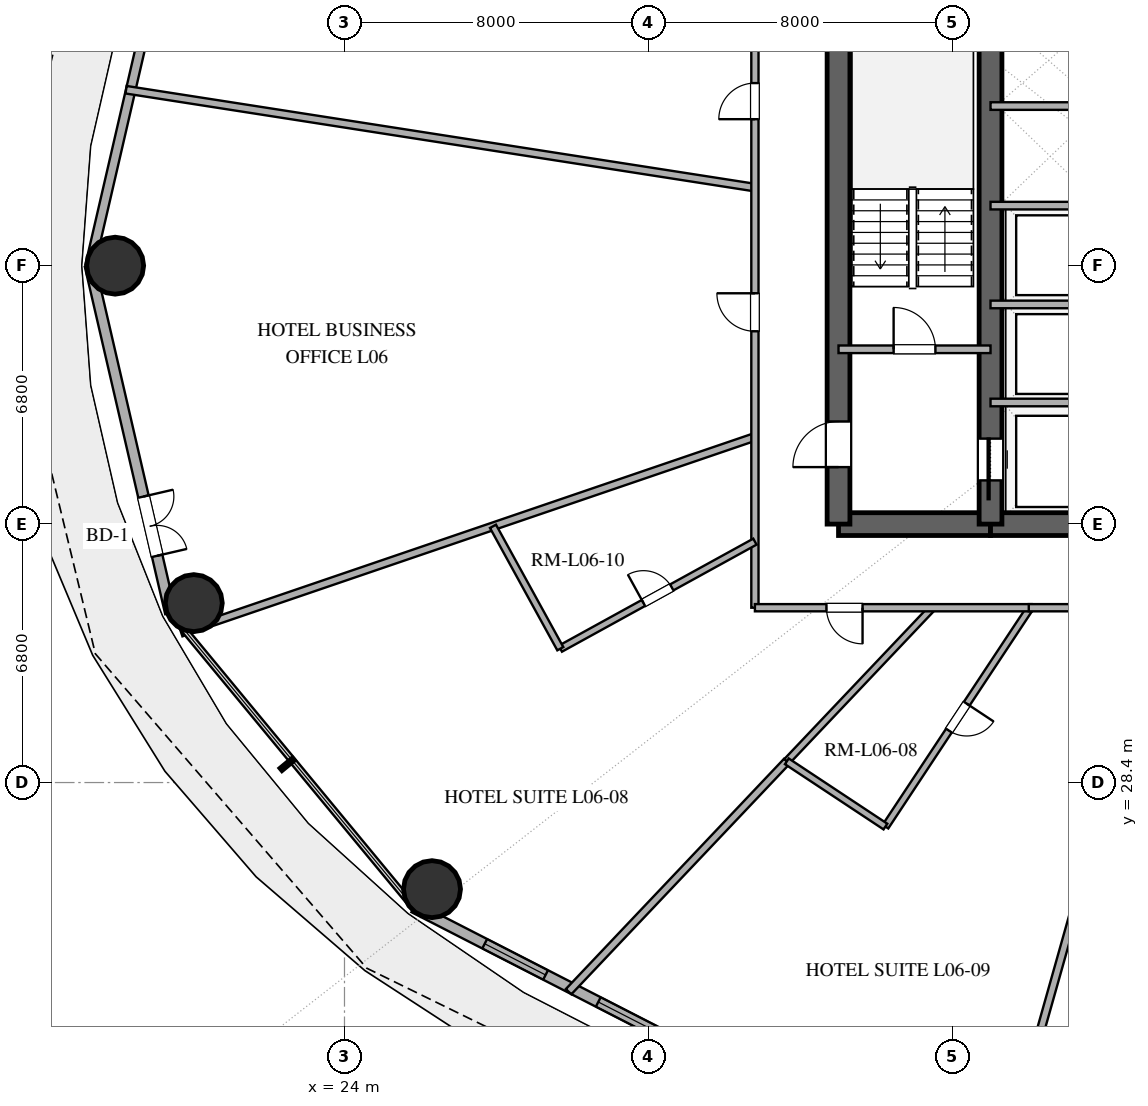
"""IFC4 building model, lengths in metres.
Left out: names, types, materials, properties, quantities, classifications, styles, units other than length and angle.
Written with IfcOpenShell. Run it as: python <this file> out.ifc"""

import sys

from ifc_helpers import new_model, si_unit, direction, frame, frame_2d, origin, origin_2d, place, context, subcontext, project, spatial, rectangle, hollow_circle, extrude, element, fill, save


model = new_model("IFC4")
c1 = context("Model", 3, precision=1e-05, world=origin(), true_north=direction((0.0, 1.0)))
c2 = subcontext(c1, "Body", "Model", "MODEL_VIEW")
j1 = project(units=[si_unit("LENGTHUNIT", "METRE"), si_unit("PLANEANGLEUNIT", "RADIAN")], contexts=[c1])
p1 = place(None, origin())
s1 = spatial("IfcSite", under=j1, at=p1, CompositionType="ELEMENT")
p2 = place(p1, origin())
s2 = spatial("IfcBuilding", under=s1, at=p2, CompositionType="ELEMENT")
p3 = place(p2, frame((0.0, 0.0, 31.8)))
s3 = spatial("IfcBuildingStorey", under=s2, at=p3, CompositionType="ELEMENT", Elevation=31.8)
p4 = place(p3, frame((37.0, 35.2, 0.0), z_axis=(0.0, 0.0, 1.0), x_axis=(1.0, 0.0, 0.0)))
e1 = element("IfcWall", 1, at=p4, inside=s3, PredefinedType="SHEAR", context=c2, shape_type="SweptSolid", body=[
    extrude(rectangle(XDim=4.0, YDim=0.6, at=frame_2d((2.0, 0.0))), origin(), (0.0, 0.0, 1.0), 3.38),
])
p5 = place(p3, frame((41.0, 35.2, 0.0), z_axis=(0.0, 0.0, 1.0), x_axis=(1.0, 0.0, 0.0)))
e2 = element("IfcWall", 2, at=p5, inside=s3, PredefinedType="SHEAR", context=c2, shape_type="SweptSolid", body=[
    extrude(rectangle(XDim=14.0, YDim=0.6, at=frame_2d((7.0, 0.0))), origin(), (0.0, 0.0, 1.0), 3.38),
])
p6 = place(p5, frame((6.1, 0.0, 0.0)))
e3 = element("IfcOpeningElement", 3, at=p6, cuts=e2, PredefinedType="OPENING", context=c2, shape_type="SweptSolid", body=[
    extrude(rectangle(XDim=1.8, YDim=2.25, at=frame_2d((0.9, 1.125))), frame((0.0, 0.31, 0.0), z_axis=(0.0, -1.0, 0.0), x_axis=(1.0, 0.0, 0.0)), (0.0, 0.0, 1.0), 0.62),
])
p7 = place(p3, frame((37.0, 35.2, 0.0), z_axis=(0.0, 0.0, 1.0), x_axis=(0.0, 1.0, 0.0)))
e4 = element("IfcWall", 4, at=p7, inside=s3, PredefinedType="SHEAR", context=c2, shape_type="SweptSolid", body=[
    extrude(rectangle(XDim=13.6, YDim=0.6, at=frame_2d((6.8, 0.0))), origin(), (0.0, 0.0, 1.0), 3.38),
])
p8 = place(p7, frame((1.5, 0.0, 0.0)))
e5 = element("IfcOpeningElement", 5, at=p8, cuts=e4, PredefinedType="OPENING", context=c2, shape_type="SweptSolid", body=[
    extrude(rectangle(XDim=1.2, YDim=2.15, at=frame_2d((0.6, 1.075))), frame((0.0, 0.31, 0.0), z_axis=(0.0, -1.0, 0.0), x_axis=(1.0, 0.0, 0.0)), (0.0, 0.0, 1.0), 0.62),
])
p9 = place(p3, frame((41.0, 35.2, 0.0), z_axis=(0.0, 0.0, 1.0), x_axis=(0.0, 1.0, 0.0)))
e6 = element("IfcWall", 6, at=p9, inside=s3, PredefinedType="SHEAR", context=c2, shape_type="SweptSolid", body=[
    extrude(rectangle(XDim=13.6, YDim=0.6, at=frame_2d((6.8, 0.0))), origin(), (0.0, 0.0, 1.0), 3.38),
])
p10 = place(p9, frame((1.15, 0.0, 0.0)))
e7 = element("IfcOpeningElement", 7, at=p10, cuts=e6, PredefinedType="OPENING", context=c2, shape_type="SweptSolid", body=[
    extrude(rectangle(XDim=1.1, YDim=2.2, at=frame_2d((0.55, 1.1))), frame((0.0, 0.31, 0.0), z_axis=(0.0, -1.0, 0.0), x_axis=(1.0, 0.0, 0.0)), (0.0, 0.0, 1.0), 0.62),
])
for number, where, z_axis, x_axis in (
    (8, (17.965, 42.0, 0.0), (0.0, 0.0, 1.0), (1.0, 0.0, 0.0)),
    (9, (20.034, 33.122, 0.0), (0.0, 0.0, 1.0), (1.0, 0.0, 0.0)),
    (10, (26.303, 25.595, 0.0), (0.0, 0.0, 1.0), (1.0, 0.0, 0.0)),
):
    element("IfcColumn", number, at=place(p3, frame(where, z_axis=z_axis, x_axis=x_axis)), inside=s3, PredefinedType="COLUMN", context=c2, shape_type="SweptSolid", body=[
        extrude(hollow_circle(Radius=0.75, WallThickness=0.04, at=origin_2d()), origin(), (0.0, 0.0, 1.0), 3.38),
    ])
p11 = place(p3, frame((19.419, 51.138, 0.0), z_axis=(0.0, 0.0, 1.0), x_axis=(-0.225454452941, -0.974253709076, 0.0)))
e11 = element("IfcWall", 11, at=p11, inside=s3, PredefinedType="SOLIDWALL", context=c2, shape_type="SweptSolid", body=[
    extrude(rectangle(XDim=9.38, YDim=0.25, at=frame_2d((4.69, 0.0))), origin(), (0.0, 0.0, 1.0), 3.38),
])
p12 = place(p3, frame((17.304, 42.0, 0.0), z_axis=(0.0, 0.0, 1.0), x_axis=(0.225454452941, -0.974253709076, 0.0)))
e12 = element("IfcWall", 12, at=p12, inside=s3, PredefinedType="SOLIDWALL", context=c2, shape_type="SweptSolid", body=[
    extrude(rectangle(XDim=9.38, YDim=0.28, at=frame_2d((4.69, 0.0))), origin(), (0.0, 0.0, 1.0), 3.38),
])
p13 = place(p12, frame((6.235, 0.0, 0.0)))
e13 = element("IfcOpeningElement", 13, at=p13, cuts=e12, PredefinedType="OPENING", context=c2, shape_type="SweptSolid", body=[
    extrude(rectangle(XDim=1.6, YDim=2.25, at=frame_2d((0.8, 1.125))), frame((0.0, 0.15, 0.0), z_axis=(0.0, -1.0, 0.0), x_axis=(1.0, 0.0, 0.0)), (0.0, 0.0, 1.0), 0.3),
])
p14 = place(p3, frame((25.826, 25.114, 0.0), z_axis=(0.0, 0.0, 1.0), x_axis=(0.889853976658, -0.456245438581, 0.0)))
e14 = element("IfcWall", 14, at=p14, inside=s3, PredefinedType="SOLIDWALL", context=c2, shape_type="SweptSolid", body=[
    extrude(rectangle(XDim=11.346, YDim=0.28, at=frame_2d((5.673, 0.0))), origin(), (0.0, 0.0, 1.0), 3.38),
])
p15 = place(p14, frame((2.095, 0.0, 0.85)))
e15 = element("IfcOpeningElement", 15, at=p15, cuts=e14, PredefinedType="OPENING", context=c2, shape_type="SweptSolid", body=[
    extrude(rectangle(XDim=1.8, YDim=2.2, at=frame_2d((0.9, 1.1))), frame((0.0, 0.15, 0.0), z_axis=(0.0, -1.0, 0.0), x_axis=(1.0, 0.0, 0.0)), (0.0, 0.0, 1.0), 0.3),
])
p16 = place(p14, frame((5.453, 0.0, 0.85)))
e16 = element("IfcOpeningElement", 16, at=p16, cuts=e14, PredefinedType="OPENING", context=c2, shape_type="SweptSolid", body=[
    extrude(rectangle(XDim=1.65, YDim=2.0, at=frame_2d((0.825, 1.0))), frame((0.0, 0.15, 0.0), z_axis=(0.0, -1.0, 0.0), x_axis=(1.0, 0.0, 0.0)), (0.0, 0.0, 1.0), 0.3),
])
p17 = place(p14, frame((7.672, 0.0, 0.85)))
e17 = element("IfcOpeningElement", 17, at=p17, cuts=e14, PredefinedType="OPENING", context=c2, shape_type="SweptSolid", body=[
    extrude(rectangle(XDim=1.65, YDim=2.0, at=frame_2d((0.825, 1.0))), frame((0.0, 0.15, 0.0), z_axis=(0.0, -1.0, 0.0), x_axis=(1.0, 0.0, 0.0)), (0.0, 0.0, 1.0), 0.3),
])
p18 = place(p3, frame((37.0, 39.8, 0.0), z_axis=(0.0, 0.0, 1.0), x_axis=(1.0, 0.0, 0.0)))
e18 = element("IfcWall", 18, at=p18, inside=s3, PredefinedType="SOLIDWALL", context=c2, shape_type="SweptSolid", body=[
    extrude(rectangle(XDim=4.0, YDim=0.2, at=frame_2d((2.0, 0.0))), origin(), (0.0, 0.0, 1.0), 2.74),
])
p19 = place(p18, frame((1.45, 0.0, 0.0)))
e19 = element("IfcOpeningElement", 19, at=p19, cuts=e18, PredefinedType="OPENING", context=c2, shape_type="SweptSolid", body=[
    extrude(rectangle(XDim=1.1, YDim=2.15, at=frame_2d((0.55, 1.075))), frame((0.0, 0.11, 0.0), z_axis=(0.0, -1.0, 0.0), x_axis=(1.0, 0.0, 0.0)), (0.0, 0.0, 1.0), 0.22),
])
for number, where, z_axis, x_axis in (
    (20, (41.0, 38.4, 0.0), (0.0, 0.0, 1.0), (1.0, 0.0, 0.0)),
    (21, (41.0, 46.2, 0.0), (0.0, 0.0, 1.0), (1.0, 0.0, 0.0)),
    (22, (41.0, 40.98, 0.0), (0.0, 0.0, 1.0), (1.0, 0.0, 0.0)),
    (23, (41.0, 43.58, 0.0), (0.0, 0.0, 1.0), (1.0, 0.0, 0.0)),
):
    element("IfcWall", number, at=place(p3, frame(where, z_axis=z_axis, x_axis=x_axis)), inside=s3, PredefinedType="SOLIDWALL", context=c2, shape_type="SweptSolid", body=[
        extrude(rectangle(XDim=2.95, YDim=0.2, at=frame_2d((1.475, 0.0))), origin(), (0.0, 0.0, 1.0), 2.74),
    ])
p20 = place(p3, frame((18.253, 46.63, 0.0), z_axis=(0.0, 0.0, 1.0), x_axis=(0.988105936892, -0.153774697134, 0.0)))
e24 = element("IfcWall", 24, at=p20, inside=s3, PredefinedType="PARTITIONING", context=c2, shape_type="SweptSolid", body=[
    extrude(rectangle(XDim=16.747, YDim=0.2, at=frame_2d((8.373, 0.0))), origin(), (0.0, 0.0, 1.0), 2.74),
])
p21 = place(p3, frame((34.8, 37.494, 0.0), z_axis=(0.0, 0.0, 1.0), x_axis=(-0.946390715793, -0.32302416792, 0.0)))
e25 = element("IfcWall", 25, at=p21, inside=s3, PredefinedType="PARTITIONING", context=c2, shape_type="SweptSolid", body=[
    extrude(rectangle(XDim=15.952, YDim=0.2, at=frame_2d((7.976, 0.0))), origin(), (0.0, 0.0, 1.0), 2.74),
])
p22 = place(p3, frame((29.897, 22.898, 0.0), z_axis=(0.0, 0.0, 1.0), x_axis=(0.687860615602, 0.725842802198, 0.0)))
e26 = element("IfcWall", 26, at=p22, inside=s3, PredefinedType="PARTITIONING", context=c2, shape_type="SweptSolid", body=[
    extrude(rectangle(XDim=8.35, YDim=0.2, at=frame_2d((4.175, 0.0))), origin(), (0.0, 0.0, 1.0), 2.74),
])
p23 = place(p3, frame((41.499, 18.978, 0.0), z_axis=(0.0, 0.0, 1.0), x_axis=(0.271768364569, 0.962362694632, 0.0)))
e27 = element("IfcWall", 27, at=p23, inside=s3, PredefinedType="PARTITIONING", context=c2, shape_type="SweptSolid", body=[
    extrude(rectangle(XDim=7.921, YDim=0.2, at=frame_2d((3.96, 0.0))), origin(), (0.0, 0.0, 1.0), 2.74),
])
p24 = place(p3, frame((42.045, 33.0, 0.0), z_axis=(0.0, 0.0, 1.0), x_axis=(-0.551832909025, -0.833954699319, 0.0)))
e28 = element("IfcWall", 28, at=p24, inside=s3, PredefinedType="PLUMBINGWALL", context=c2, shape_type="SweptSolid", body=[
    extrude(rectangle(XDim=6.905, YDim=0.18, at=frame_2d((3.452, 0.0))), origin(), (0.0, 0.0, 1.0), 2.74),
])
p25 = place(p24, frame((3.027, 0.0, 0.0)))
e29 = element("IfcOpeningElement", 29, at=p25, cuts=e28, PredefinedType="OPENING", context=c2, shape_type="SweptSolid", body=[
    extrude(rectangle(XDim=0.85, YDim=2.1, at=frame_2d((0.425, 1.05))), frame((0.0, 0.1, 0.0), z_axis=(0.0, -1.0, 0.0), x_axis=(1.0, 0.0, 0.0)), (0.0, 0.0, 1.0), 0.2),
])
p26 = place(p3, frame((34.8, 33.0, 0.0), z_axis=(0.0, 0.0, 1.0), x_axis=(0.0, 1.0, 0.0)))
e30 = element("IfcWall", 30, at=p26, inside=s3, PredefinedType="PARTITIONING", context=c2, shape_type="SweptSolid", body=[
    extrude(rectangle(XDim=18.0, YDim=0.19, at=frame_2d((9.0, 0.0))), origin(), (0.0, 0.0, 1.0), 2.74),
])
p27 = place(p26, frame((7.274, 0.0, 0.0)))
e31 = element("IfcOpeningElement", 31, at=p27, cuts=e30, PredefinedType="OPENING", context=c2, shape_type="SweptSolid", body=[
    extrude(rectangle(XDim=1.0, YDim=2.2, at=frame_2d((0.5, 1.1))), frame((0.0, 0.105, 0.0), z_axis=(0.0, -1.0, 0.0), x_axis=(1.0, 0.0, 0.0)), (0.0, 0.0, 1.0), 0.21),
])
p28 = place(p26, frame((12.854, 0.0, 0.0)))
e32 = element("IfcOpeningElement", 32, at=p28, cuts=e30, PredefinedType="OPENING", context=c2, shape_type="SweptSolid", body=[
    extrude(rectangle(XDim=0.95, YDim=2.15, at=frame_2d((0.475, 1.075))), frame((0.0, 0.105, 0.0), z_axis=(0.0, -1.0, 0.0), x_axis=(1.0, 0.0, 0.0)), (0.0, 0.0, 1.0), 0.21),
])
p29 = place(p3, frame((29.679, 31.922, 0.0), z_axis=(0.0, 0.0, 1.0), x_axis=(0.876185038284, 0.481974873503, 0.0)))
e33 = element("IfcWall", 33, at=p29, inside=s3, PredefinedType="PLUMBINGWALL", context=c2, shape_type="SweptSolid", body=[
    extrude(rectangle(XDim=5.844, YDim=0.18, at=frame_2d((2.922, 0.0))), origin(), (0.0, 0.0, 1.0), 2.74),
])
p30 = place(p29, frame((2.497, 0.0, 0.0)))
e34 = element("IfcOpeningElement", 34, at=p30, cuts=e33, PredefinedType="OPENING", context=c2, shape_type="SweptSolid", body=[
    extrude(rectangle(XDim=0.85, YDim=2.1, at=frame_2d((0.425, 1.05))), frame((0.0, 0.1, 0.0), z_axis=(0.0, -1.0, 0.0), x_axis=(1.0, 0.0, 0.0)), (0.0, 0.0, 1.0), 0.2),
])
p31 = place(p3, frame((35.64, 28.958, 0.0), z_axis=(0.0, 0.0, 1.0), x_axis=(0.687867465085, 0.725836311077, 0.0)))
e35 = element("IfcWall", 35, at=p31, inside=s3, PredefinedType="PLUMBINGWALL", context=c2, shape_type="SweptSolid", body=[
    extrude(rectangle(XDim=5.568, YDim=0.18, at=frame_2d((2.784, 0.0))), origin(), (0.0, 0.0, 1.0), 2.74),
])
p32 = place(p3, frame((42.083, 33.0, 0.0), z_axis=(0.0, 0.0, 1.0), x_axis=(-1.0, 0.0, 0.0)))
e36 = element("IfcWall", 36, at=p32, inside=s3, PredefinedType="PARTITIONING", context=c2, shape_type="SweptSolid", body=[
    extrude(rectangle(XDim=7.283, YDim=0.19, at=frame_2d((3.642, 0.0))), origin(), (0.0, 0.0, 1.0), 2.74),
])
p33 = place(p32, frame((4.451, 0.0, 0.0)))
e37 = element("IfcOpeningElement", 37, at=p33, cuts=e36, PredefinedType="OPENING", context=c2, shape_type="SweptSolid", body=[
    extrude(rectangle(XDim=0.95, YDim=2.15, at=frame_2d((0.475, 1.075))), frame((0.0, 0.105, 0.0), z_axis=(0.0, -1.0, 0.0), x_axis=(1.0, 0.0, 0.0)), (0.0, 0.0, 1.0), 0.21),
])
p34 = place(p3, frame((27.908, 35.142, 0.0), z_axis=(0.0, 0.0, 1.0), x_axis=(0.481967195945, -0.876189261537, 0.0)))
e38 = element("IfcWall", 38, at=p34, inside=s3, PredefinedType="PLUMBINGWALL", context=c2, shape_type="SweptSolid", body=[
    extrude(rectangle(XDim=3.676, YDim=0.18, at=frame_2d((1.838, 0.0))), origin(), (0.0, 0.0, 1.0), 2.74),
])
p35 = place(p3, frame((47.118, 33.0, 0.0), z_axis=(0.0, 0.0, 1.0), x_axis=(-1.0, 0.0, 0.0)))
e39 = element("IfcWall", 39, at=p35, inside=s3, PredefinedType="PARTITIONING", context=c2, shape_type="SweptSolid", body=[
    extrude(rectangle(XDim=5.112, YDim=0.19, at=frame_2d((2.556, 0.0))), origin(), (0.0, 0.0, 1.0), 2.74),
])
p36 = place(p35, frame((2.894, 0.0, 0.0)))
e40 = element("IfcOpeningElement", 40, at=p36, cuts=e39, PredefinedType="OPENING", context=c2, shape_type="SweptSolid", body=[
    extrude(rectangle(XDim=0.95, YDim=2.15, at=frame_2d((0.475, 1.075))), frame((0.0, 0.105, 0.0), z_axis=(0.0, -1.0, 0.0), x_axis=(1.0, 0.0, 0.0)), (0.0, 0.0, 1.0), 0.21),
])
p37 = place(p3, frame((38.235, 27.242, 0.0), z_axis=(0.0, 0.0, 1.0), x_axis=(-0.833965136837, 0.551817135055, 0.0)))
e41 = element("IfcWall", 41, at=p37, inside=s3, PredefinedType="PLUMBINGWALL", context=c2, shape_type="SweptSolid", body=[
    extrude(rectangle(XDim=3.111, YDim=0.18, at=frame_2d((1.555, 0.0))), origin(), (0.0, 0.0, 1.0), 2.74),
])
p38 = place(p13, origin())
e42 = element("IfcDoor", 42, at=p38, inside=s3, OperationType="DOUBLE_DOOR_SINGLE_SWING", PredefinedType="DOOR", context=c2, shape_type="SweptSolid", body=[
    extrude(rectangle(XDim=1.6, YDim=2.25, at=frame_2d((0.8, 1.125))), frame((0.0, 0.025, 0.0), z_axis=(0.0, -1.0, 0.0), x_axis=(1.0, 0.0, 0.0)), (0.0, 0.0, 1.0), 0.05),
])
fill(e13, e42)
p39 = place(p15, origin())
e43 = element("IfcWindow", 43, at=p39, inside=s3, PartitioningType="SINGLE_PANEL", PredefinedType="WINDOW", context=c2, shape_type="SweptSolid", body=[
    extrude(rectangle(XDim=1.8, YDim=2.2, at=frame_2d((0.9, 1.1))), frame((0.0, 0.03, 0.0), z_axis=(0.0, -1.0, 0.0), x_axis=(1.0, 0.0, 0.0)), (0.0, 0.0, 1.0), 0.06),
])
fill(e15, e43)
p40 = place(p16, origin())
e44 = element("IfcWindow", 44, at=p40, inside=s3, PartitioningType="SINGLE_PANEL", PredefinedType="WINDOW", context=c2, shape_type="SweptSolid", body=[
    extrude(rectangle(XDim=1.65, YDim=2.0, at=frame_2d((0.825, 1.0))), frame((0.0, 0.03, 0.0), z_axis=(0.0, -1.0, 0.0), x_axis=(1.0, 0.0, 0.0)), (0.0, 0.0, 1.0), 0.06),
])
fill(e16, e44)
p41 = place(p10, origin())
e45 = element("IfcDoor", 45, at=p41, inside=s3, OperationType="SLIDING_TO_LEFT", PredefinedType="DOOR", context=c2, shape_type="SweptSolid", body=[
    extrude(rectangle(XDim=1.1, YDim=2.2, at=frame_2d((0.55, 1.1))), frame((0.0, 0.025, 0.0), z_axis=(0.0, -1.0, 0.0), x_axis=(1.0, 0.0, 0.0)), (0.0, 0.0, 1.0), 0.05),
])
fill(e7, e45)
p42 = place(p8, origin())
e46 = element("IfcDoor", 46, at=p42, inside=s3, OperationType="SINGLE_SWING_LEFT", PredefinedType="DOOR", context=c2, shape_type="SweptSolid", body=[
    extrude(rectangle(XDim=1.2, YDim=2.15, at=frame_2d((0.6, 1.075))), frame((0.0, 0.025, 0.0), z_axis=(0.0, -1.0, 0.0), x_axis=(1.0, 0.0, 0.0)), (0.0, 0.0, 1.0), 0.05),
])
fill(e5, e46)
p43 = place(p19, origin())
e47 = element("IfcDoor", 47, at=p43, inside=s3, OperationType="SINGLE_SWING_LEFT", PredefinedType="DOOR", context=c2, shape_type="SweptSolid", body=[
    extrude(rectangle(XDim=1.1, YDim=2.15, at=frame_2d((0.55, 1.075))), frame((0.0, 0.025, 0.0), z_axis=(0.0, -1.0, 0.0), x_axis=(1.0, 0.0, 0.0)), (0.0, 0.0, 1.0), 0.05),
])
fill(e19, e47)
p44 = place(p25, origin())
e48 = element("IfcDoor", 48, at=p44, inside=s3, OperationType="SINGLE_SWING_LEFT", PredefinedType="DOOR", context=c2, shape_type="SweptSolid", body=[
    extrude(rectangle(XDim=0.85, YDim=2.1, at=frame_2d((0.425, 1.05))), frame((0.0, 0.025, 0.0), z_axis=(0.0, -1.0, 0.0), x_axis=(1.0, 0.0, 0.0)), (0.0, 0.0, 1.0), 0.05),
])
fill(e29, e48)
p45 = place(p27, origin())
e49 = element("IfcDoor", 49, at=p45, inside=s3, OperationType="SINGLE_SWING_RIGHT", PredefinedType="DOOR", context=c2, shape_type="SweptSolid", body=[
    extrude(rectangle(XDim=1.0, YDim=2.2, at=frame_2d((0.5, 1.1))), frame((0.0, 0.025, 0.0), z_axis=(0.0, -1.0, 0.0), x_axis=(1.0, 0.0, 0.0)), (0.0, 0.0, 1.0), 0.05),
])
fill(e31, e49)
p46 = place(p28, origin())
e50 = element("IfcDoor", 50, at=p46, inside=s3, OperationType="SINGLE_SWING_LEFT", PredefinedType="DOOR", context=c2, shape_type="SweptSolid", body=[
    extrude(rectangle(XDim=0.95, YDim=2.15, at=frame_2d((0.475, 1.075))), frame((0.0, 0.025, 0.0), z_axis=(0.0, -1.0, 0.0), x_axis=(1.0, 0.0, 0.0)), (0.0, 0.0, 1.0), 0.05),
])
fill(e32, e50)
p47 = place(p30, origin())
e51 = element("IfcDoor", 51, at=p47, inside=s3, OperationType="SINGLE_SWING_LEFT", PredefinedType="DOOR", context=c2, shape_type="SweptSolid", body=[
    extrude(rectangle(XDim=0.85, YDim=2.1, at=frame_2d((0.425, 1.05))), frame((0.0, 0.025, 0.0), z_axis=(0.0, -1.0, 0.0), x_axis=(1.0, 0.0, 0.0)), (0.0, 0.0, 1.0), 0.05),
])
fill(e34, e51)
p48 = place(p33, origin())
e52 = element("IfcDoor", 52, at=p48, inside=s3, OperationType="SINGLE_SWING_LEFT", PredefinedType="DOOR", context=c2, shape_type="SweptSolid", body=[
    extrude(rectangle(XDim=0.95, YDim=2.15, at=frame_2d((0.475, 1.075))), frame((0.0, 0.025, 0.0), z_axis=(0.0, -1.0, 0.0), x_axis=(1.0, 0.0, 0.0)), (0.0, 0.0, 1.0), 0.05),
])
fill(e37, e52)
save(model, sys.argv[1])
